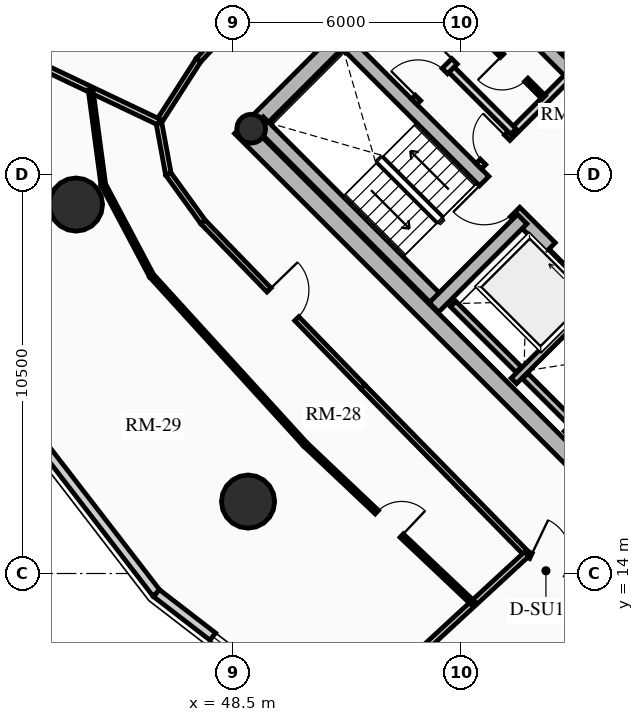
"""IFC4 building model, lengths in metres.
Left out: names, types, materials, properties, quantities, classifications, styles, units other than length and angle.
Written with IfcOpenShell. Run it as: python <this file> out.ifc"""

import sys

from ifc_helpers import new_model, si_unit, direction, frame, frame_2d, origin, origin_2d, place, context, subcontext, project, spatial, rectangle, circle, hollow_circle, extrude, source, transform, mapped, element, fill, save


model = new_model("IFC4")
c1 = context("Model", 3, precision=1e-05, world=origin(), true_north=direction((0.0, 1.0)))
c2 = subcontext(c1, "Body", "Model", "MODEL_VIEW")
j1 = project(units=[si_unit("LENGTHUNIT", "METRE"), si_unit("PLANEANGLEUNIT", "RADIAN")], contexts=[c1])
p1 = place(None, origin())
s1 = spatial("IfcSite", under=j1, at=p1, CompositionType="ELEMENT")
p2 = place(p1, origin())
s2 = spatial("IfcBuilding", under=s1, at=p2, CompositionType="ELEMENT")
p3 = place(p2, frame((0.0, 0.0, 119.62)))
s3 = spatial("IfcBuildingStorey", under=s2, at=p3, CompositionType="ELEMENT", Elevation=119.62)
for number, where, z_axis, x_axis in (
    (1, (58.737, 15.697, 0.0), (0.0, 0.0, 1.0), (-0.707, 0.707, 0.0)),
    (2, (66.303, 23.263, 0.0), (0.0, 0.0, 1.0), (-0.707, 0.707, 0.0)),
):
    element("IfcWall", number, at=place(p3, frame(where, z_axis=z_axis, x_axis=x_axis)), inside=s3, PredefinedType="SHEAR", context=c2, shape_type="SweptSolid", body=[
        extrude(rectangle(XDim=14.2, YDim=0.45, at=frame_2d((7.1, 0.0))), origin(), (0.0, 0.0, 1.0), 2.91),
    ])
p4 = place(p3, frame((48.856, 25.578, 0.0), z_axis=(0.0, 0.0, 1.0), x_axis=(0.707106781187, 0.707106781187, 0.0)))
e3 = element("IfcWall", 3, at=p4, inside=s3, PredefinedType="SHEAR", context=c2, shape_type="SweptSolid", body=[
    extrude(rectangle(XDim=10.7, YDim=0.45, at=frame_2d((5.35, 0.0))), origin(), (0.0, 0.0, 1.0), 2.91),
])
m1 = source(origin(), c2, "Body", "SweptSolid", [
    extrude(rectangle(XDim=1.5, YDim=2.02, at=frame_2d((0.75, 1.01))), frame((0.0, 0.235, 0.0), z_axis=(0.0, -1.0, 0.0), x_axis=(1.0, 0.0, 0.0)), (0.0, 0.0, 1.0), 0.47),
])
p5 = place(p4, frame((4.6, 0.0, 0.0)))
e4 = element("IfcOpeningElement", 4, at=p5, cuts=e3, PredefinedType="OPENING", context=c2, shape_type="MappedRepresentation", body=[
    mapped(m1, transform((0.0, 0.0, 0.0), x_axis=(1.0, 0.0, 0.0), y_axis=(0.0, 1.0, 0.0), z_axis=(0.0, 0.0, 1.0), scale=1.0)),
])
p6 = place(p3, frame((61.078, 18.355, 0.0), z_axis=(0.0, 0.0, 1.0), x_axis=(-0.707106781187, 0.707106781187, 0.0)))
e5 = element("IfcWall", 5, at=p6, inside=s3, PredefinedType="SHEAR", context=c2, shape_type="SweptSolid", body=[
    extrude(rectangle(XDim=13.75, YDim=0.35, at=frame_2d((6.875, 0.0))), origin(), (0.0, 0.0, 1.0), 2.91),
])
m2 = source(origin(), c2, "Body", "SweptSolid", [
    extrude(rectangle(XDim=1.1, YDim=2.015, at=frame_2d((0.55, 1.007))), frame((0.0, 0.185, 0.0), z_axis=(0.0, -1.0, 0.0), x_axis=(1.0, 0.0, 0.0)), (0.0, 0.0, 1.0), 0.37),
])
p7 = place(p6, frame((4.875, 0.0, 0.0)))
e6 = element("IfcOpeningElement", 6, at=p7, cuts=e5, PredefinedType="OPENING", context=c2, shape_type="MappedRepresentation", body=[
    mapped(m2, transform((0.0, 0.0, 0.0), x_axis=(1.0, 0.0, 0.0), y_axis=(0.0, 1.0, 0.0), z_axis=(0.0, 0.0, 1.0), scale=1.0)),
])
m3 = source(origin(), c2, "Body", "SweptSolid", [
    extrude(rectangle(XDim=1.15, YDim=2.02, at=frame_2d((0.575, 1.01))), frame((0.0, 0.185, 0.0), z_axis=(0.0, -1.0, 0.0), x_axis=(1.0, 0.0, 0.0)), (0.0, 0.0, 1.0), 0.37),
])
p8 = place(p6, frame((7.295, 0.0, 0.0)))
e7 = element("IfcOpeningElement", 7, at=p8, cuts=e5, PredefinedType="OPENING", context=c2, shape_type="MappedRepresentation", body=[
    mapped(m3, transform((0.0, 0.0, 0.0), x_axis=(1.0, 0.0, 0.0), y_axis=(0.0, 1.0, 0.0), z_axis=(0.0, 0.0, 1.0), scale=1.0)),
])
p9 = place(p3, frame((63.645, 20.922, 0.0), z_axis=(0.0, 0.0, 1.0), x_axis=(-0.707106781187, 0.707106781187, 0.0)))
e8 = element("IfcWall", 8, at=p9, inside=s3, PredefinedType="SHEAR", context=c2, shape_type="SweptSolid", body=[
    extrude(rectangle(XDim=13.75, YDim=0.35, at=frame_2d((6.875, 0.0))), origin(), (0.0, 0.0, 1.0), 2.91),
])
p10 = place(p9, frame((10.0, 0.0, 0.0)))
e9 = element("IfcOpeningElement", 9, at=p10, cuts=e8, PredefinedType="OPENING", context=c2, shape_type="MappedRepresentation", body=[
    mapped(m2, transform((0.0, 0.0, 0.0), x_axis=(1.0, 0.0, 0.0), y_axis=(0.0, 1.0, 0.0), z_axis=(0.0, 0.0, 1.0), scale=1.0)),
])
p11 = place(p9, frame((12.0, 0.0, 0.0)))
e10 = element("IfcOpeningElement", 10, at=p11, cuts=e8, PredefinedType="OPENING", context=c2, shape_type="MappedRepresentation", body=[
    mapped(m2, transform((0.0, 0.0, 0.0), x_axis=(1.0, 0.0, 0.0), y_axis=(0.0, 1.0, 0.0), z_axis=(0.0, 0.0, 1.0), scale=1.0)),
])
p12 = place(p9, frame((5.305, 0.0, 0.0)))
e11 = element("IfcOpeningElement", 11, at=p12, cuts=e8, PredefinedType="OPENING", context=c2, shape_type="MappedRepresentation", body=[
    mapped(m3, transform((0.0, 0.0, 0.0), x_axis=(1.0, 0.0, 0.0), y_axis=(0.0, 1.0, 0.0), z_axis=(0.0, 0.0, 1.0), scale=1.0)),
])
p13 = place(p3, frame((53.922, 21.141, 0.0), z_axis=(0.0, 0.0, 1.0), x_axis=(-0.707088616009, 0.707124945897, 0.0)))
e12 = element("IfcWall", 12, at=p13, inside=s3, PredefinedType="SHEAR", context=c2, shape_type="SweptSolid", body=[
    extrude(rectangle(XDim=6.72, YDim=0.35, at=frame_2d((3.36, 0.0))), origin(), (0.0, 0.0, 1.0), 2.91),
])
p14 = place(p3, frame((53.784, 21.003, 0.0), z_axis=(0.0, 0.0, 1.0), x_axis=(0.707106781187, 0.707106781187, 0.0)))
e13 = element("IfcWall", 13, at=p14, inside=s3, PredefinedType="SHEAR", context=c2, shape_type="SweptSolid", body=[
    extrude(rectangle(XDim=3.285, YDim=0.35, at=frame_2d((1.643, 0.0))), origin(), (0.0, 0.0, 1.0), 2.91),
])
p15 = place(p3, frame((48.976, 25.706, 0.0), z_axis=(0.0, 0.0, 1.0), x_axis=(0.707106781187, 0.707106781187, 0.0)))
e14 = element("IfcColumn", 14, at=p15, inside=s3, PredefinedType="COLUMN", context=c2, shape_type="SweptSolid", body=[
    extrude(hollow_circle(Radius=0.38, WallThickness=0.032, at=origin_2d()), origin(), (0.0, 0.0, 1.0), 2.91),
])
for number, where, z_axis, x_axis in (
    (15, (44.365, 23.709, 0.0), (0.0, 0.0, 1.0), (1.0, 0.0, 0.0)),
    (16, (48.893, 15.893, 0.0), (0.0, 0.0, 1.0), (1.0, 0.0, 0.0)),
):
    element("IfcColumn", number, at=place(p3, frame(where, z_axis=z_axis, x_axis=x_axis)), inside=s3, PredefinedType="USERDEFINED", context=c2, shape_type="SweptSolid", body=[
        extrude(circle(Radius=0.7, at=origin_2d()), origin(), (0.0, 0.0, 1.0), 2.91),
    ])
p16 = place(p3, frame((46.483, 13.483, 0.0), z_axis=(0.0, 0.0, 1.0), x_axis=(-0.61054437102, 0.791982052206, 0.0)))
e17 = element("IfcWall", 17, at=p16, inside=s3, PredefinedType="SOLIDWALL", context=c2, shape_type="SweptSolid", body=[
    extrude(rectangle(XDim=5.942, YDim=0.24, at=frame_2d((2.971, 0.0))), origin(), (0.0, 0.0, 1.0), 2.179),
])
p17 = place(p3, frame((51.189, 9.855, 0.0), z_axis=(0.0, 0.0, 1.0), x_axis=(-0.791982052206, 0.61054437102, 0.0)))
e18 = element("IfcWall", 18, at=p17, inside=s3, PredefinedType="SOLIDWALL", context=c2, shape_type="SweptSolid", body=[
    extrude(rectangle(XDim=5.942, YDim=0.24, at=frame_2d((2.971, 0.0))), origin(), (0.0, 0.0, 1.0), 2.179),
])
m4 = source(origin(), c2, "Body", "SweptSolid", [
    extrude(rectangle(XDim=2.2, YDim=1.35, at=frame_2d((1.1, 0.675))), frame((0.0, 0.13, 0.0), z_axis=(0.0, -1.0, 0.0), x_axis=(1.0, 0.0, 0.0)), (0.0, 0.0, 1.0), 0.26),
])
p18 = place(p17, frame((1.871, 0.0, 0.65)))
e19 = element("IfcOpeningElement", 19, at=p18, cuts=e18, PredefinedType="OPENING", context=c2, shape_type="MappedRepresentation", body=[
    mapped(m4, transform((0.0, 0.0, 0.0), x_axis=(1.0, 0.0, 0.0), y_axis=(0.0, 1.0, 0.0), z_axis=(0.0, 0.0, 1.0), scale=1.0)),
])
p19 = place(p3, frame((55.888, 19.069, 0.0), z_axis=(0.0, 0.0, 1.0), x_axis=(0.707106781187, 0.707106781187, 0.0)))
e20 = element("IfcWall", 20, at=p19, inside=s3, PredefinedType="SHEAR", context=c2, shape_type="SweptSolid", body=[
    extrude(rectangle(XDim=2.97, YDim=0.2, at=frame_2d((1.485, 0.0))), origin(), (0.0, 0.0, 1.0), 2.91),
])
p20 = place(p3, frame((56.015, 19.366, 0.0), z_axis=(0.0, 0.0, 1.0), x_axis=(-0.707106781187, 0.707106781187, 0.0)))
e21 = element("IfcWall", 21, at=p20, inside=s3, PredefinedType="SHEAR", context=c2, shape_type="SweptSolid", body=[
    extrude(rectangle(XDim=2.44, YDim=0.2, at=frame_2d((1.22, 0.0))), origin(), (0.0, 0.0, 1.0), 2.91),
])
p21 = place(p3, frame((57.284, 17.673, 0.0), z_axis=(0.0, 0.0, 1.0), x_axis=(0.707147878904, 0.70706568108, 0.0)))
e22 = element("IfcWall", 22, at=p21, inside=s3, PredefinedType="SHEAR", context=c2, shape_type="SweptSolid", body=[
    extrude(rectangle(XDim=2.97, YDim=0.2, at=frame_2d((1.485, 0.0))), origin(), (0.0, 0.0, 1.0), 2.91),
])
p22 = place(p3, frame((57.412, 17.97, 0.0), z_axis=(0.0, 0.0, 1.0), x_axis=(-0.707106781187, 0.707106781187, 0.0)))
e23 = element("IfcWall", 23, at=p22, inside=s3, PredefinedType="SHEAR", context=c2, shape_type="SweptSolid", body=[
    extrude(rectangle(XDim=1.735, YDim=0.2, at=frame_2d((0.867, 0.0))), origin(), (0.0, 0.0, 1.0), 2.91),
])
p23 = place(p3, frame((57.062, 27.781, 0.0), z_axis=(0.0, 0.0, 1.0), x_axis=(0.707106781187, 0.707106781187, 0.0)))
e24 = element("IfcWall", 24, at=p23, inside=s3, PredefinedType="SHEAR", context=c2, shape_type="SweptSolid", body=[
    extrude(rectangle(XDim=2.97, YDim=0.2, at=frame_2d((1.485, 0.0))), origin(), (0.0, 0.0, 1.0), 2.91),
])
p24 = place(p3, frame((54.961, 24.719, 0.0), z_axis=(0.0, 0.0, 1.0), x_axis=(0.707106781187, 0.707106781187, 0.0)))
e25 = element("IfcWall", 25, at=p24, inside=s3, PredefinedType="PARTITIONING", context=c2, shape_type="SweptSolid", body=[
    extrude(rectangle(XDim=3.28, YDim=0.2, at=frame_2d((1.64, 0.0))), origin(), (0.0, 0.0, 1.0), 2.655),
])
m5 = source(origin(), c2, "Body", "SweptSolid", [
    extrude(rectangle(XDim=0.9, YDim=2.005, at=frame_2d((0.45, 1.002))), frame((0.0, 0.11, 0.0), z_axis=(0.0, -1.0, 0.0), x_axis=(1.0, 0.0, 0.0)), (0.0, 0.0, 1.0), 0.22),
])
p25 = place(p24, frame((0.16, 0.0, 0.0)))
e26 = element("IfcOpeningElement", 26, at=p25, cuts=e25, PredefinedType="OPENING", context=c2, shape_type="MappedRepresentation", body=[
    mapped(m5, transform((0.0, 0.0, 0.0), x_axis=(1.0, 0.0, 0.0), y_axis=(0.0, 1.0, 0.0), z_axis=(0.0, 0.0, 1.0), scale=1.0)),
])
p26 = place(p3, frame((55.874, 25.631, 0.0), z_axis=(0.0, 0.0, 1.0), x_axis=(-0.707157639372, 0.707055919343, 0.0)))
e27 = element("IfcWall", 27, at=p26, inside=s3, PredefinedType="PARTITIONING", context=c2, shape_type="SweptSolid", body=[
    extrude(rectangle(XDim=2.4, YDim=0.2, at=frame_2d((1.2, 0.0))), origin(), (0.0, 0.0, 1.0), 2.655),
])
p27 = place(p3, frame((53.264, 26.416, 0.0), z_axis=(0.0, 0.0, 1.0), x_axis=(0.707106781187, 0.707106781187, 0.0)))
e28 = element("IfcWall", 28, at=p27, inside=s3, PredefinedType="PARTITIONING", context=c2, shape_type="SweptSolid", body=[
    extrude(rectangle(XDim=3.28, YDim=0.2, at=frame_2d((1.64, 0.0))), origin(), (0.0, 0.0, 1.0), 2.655),
])
m6 = source(origin(), c2, "Body", "SweptSolid", [
    extrude(rectangle(XDim=1.0, YDim=2.015, at=frame_2d((0.5, 1.007))), frame((0.0, 0.11, 0.0), z_axis=(0.0, -1.0, 0.0), x_axis=(1.0, 0.0, 0.0)), (0.0, 0.0, 1.0), 0.22),
])
p28 = place(p27, frame((0.14, 0.0, 0.0)))
e29 = element("IfcOpeningElement", 29, at=p28, cuts=e28, PredefinedType="OPENING", context=c2, shape_type="MappedRepresentation", body=[
    mapped(m6, transform((0.0, 0.0, 0.0), x_axis=(1.0, 0.0, 0.0), y_axis=(0.0, 1.0, 0.0), z_axis=(0.0, 0.0, 1.0), scale=1.0)),
])
p29 = place(p27, frame((1.5, 0.0, 0.0)))
e30 = element("IfcOpeningElement", 30, at=p29, cuts=e28, PredefinedType="OPENING", context=c2, shape_type="MappedRepresentation", body=[
    mapped(m5, transform((0.0, 0.0, 0.0), x_axis=(1.0, 0.0, 0.0), y_axis=(0.0, 1.0, 0.0), z_axis=(0.0, 0.0, 1.0), scale=1.0)),
])
p30 = place(p3, frame((56.673, 26.529, 0.0), z_axis=(0.0, 0.0, 1.0), x_axis=(-0.707052764397, 0.70716079385, 0.0)))
e31 = element("IfcWall", 31, at=p30, inside=s3, PredefinedType="PARTITIONING", context=c2, shape_type="SweptSolid", body=[
    extrude(rectangle(XDim=2.26, YDim=0.125, at=frame_2d((1.13, 0.0))), origin(), (0.0, 0.0, 1.0), 2.655),
])
m7 = source(origin(), c2, "Body", "SweptSolid", [
    extrude(rectangle(XDim=0.9, YDim=2.005, at=frame_2d((0.45, 1.002))), frame((0.0, 0.073, 0.0), z_axis=(0.0, -1.0, 0.0), x_axis=(1.0, 0.0, 0.0)), (0.0, 0.0, 1.0), 0.145),
])
p31 = place(p30, frame((0.65, 0.0, 0.0)))
e32 = element("IfcOpeningElement", 32, at=p31, cuts=e31, PredefinedType="OPENING", context=c2, shape_type="MappedRepresentation", body=[
    mapped(m7, transform((0.0, 0.0, 0.0), x_axis=(1.0, 0.0, 0.0), y_axis=(0.0, 1.0, 0.0), z_axis=(0.0, 0.0, 1.0), scale=1.0)),
])
p32 = place(p3, frame((52.043, 32.28, 0.0), z_axis=(0.0, 0.0, 1.0), x_axis=(-0.682606081633, -0.730786519661, 0.0)))
e33 = element("IfcWall", 33, at=p32, inside=s3, PredefinedType="PARTITIONING", context=c2, shape_type="SweptSolid", body=[
    extrude(rectangle(XDim=6.527, YDim=0.15, at=frame_2d((3.263, 0.0))), origin(), (0.0, 0.0, 1.0), 2.225),
])
p33 = place(p3, frame((47.588, 27.51, 0.0), z_axis=(0.0, 0.0, 1.0), x_axis=(-0.540202619347, -0.841534984449, 0.0)))
e34 = element("IfcWall", 34, at=p33, inside=s3, PredefinedType="PARTITIONING", context=c2, shape_type="SweptSolid", body=[
    extrude(rectangle(XDim=1.935, YDim=0.15, at=frame_2d((0.967, 0.0))), origin(), (0.0, 0.0, 1.0), 2.225),
])
p34 = place(p3, frame((46.543, 25.882, 0.0), z_axis=(0.0, 0.0, 1.0), x_axis=(0.181153502579, -0.983454832976, 0.0)))
e35 = element("IfcWall", 35, at=p34, inside=s3, PredefinedType="PARTITIONING", context=c2, shape_type="SweptSolid", body=[
    extrude(rectangle(XDim=1.392, YDim=0.15, at=frame_2d((0.696, 0.0))), origin(), (0.0, 0.0, 1.0), 2.225),
])
p35 = place(p3, frame((46.795, 24.513, 0.0), z_axis=(0.0, 0.0, 1.0), x_axis=(0.585628197524, -0.810579801294, 0.0)))
e36 = element("IfcWall", 36, at=p35, inside=s3, PredefinedType="PARTITIONING", context=c2, shape_type="SweptSolid", body=[
    extrude(rectangle(XDim=1.554, YDim=0.15, at=frame_2d((0.777, 0.0))), origin(), (0.0, 0.0, 1.0), 2.225),
])
p36 = place(p3, frame((47.706, 23.253, 0.0), z_axis=(0.0, 0.0, 1.0), x_axis=(0.696179266346, -0.717867974707, 0.0)))
e37 = element("IfcWall", 37, at=p36, inside=s3, PredefinedType="PARTITIONING", context=c2, shape_type="SweptSolid", body=[
    extrude(rectangle(XDim=6.045, YDim=0.15, at=frame_2d((3.022, 0.0))), origin(), (0.0, 0.0, 1.0), 2.655),
])
m8 = source(origin(), c2, "Body", "SweptSolid", [
    extrude(rectangle(XDim=1.05, YDim=2.015, at=frame_2d((0.525, 1.007))), frame((0.0, 0.085, 0.0), z_axis=(0.0, -1.0, 0.0), x_axis=(1.0, 0.0, 0.0)), (0.0, 0.0, 1.0), 0.17),
])
p37 = place(p36, frame((2.497, 0.0, 0.0)))
e38 = element("IfcOpeningElement", 38, at=p37, cuts=e37, PredefinedType="OPENING", context=c2, shape_type="MappedRepresentation", body=[
    mapped(m8, transform((0.0, 0.0, 0.0), x_axis=(1.0, 0.0, 0.0), y_axis=(0.0, 1.0, 0.0), z_axis=(0.0, 0.0, 1.0), scale=1.0)),
])
p38 = place(p3, frame((51.914, 18.914, 0.0), z_axis=(0.0, 0.0, 1.0), x_axis=(0.699999313799, -0.714143515465, 0.0)))
e39 = element("IfcWall", 39, at=p38, inside=s3, PredefinedType="PARTITIONING", context=c2, shape_type="SweptSolid", body=[
    extrude(rectangle(XDim=6.162, YDim=0.15, at=frame_2d((3.081, 0.0))), origin(), (0.0, 0.0, 1.0), 2.225),
])
p39 = place(p3, frame((56.227, 14.513, 0.0), z_axis=(0.0, 0.0, 1.0), x_axis=(0.901477579283, -0.432825801044, 0.0)))
e40 = element("IfcWall", 40, at=p39, inside=s3, PredefinedType="PARTITIONING", context=c2, shape_type="SweptSolid", body=[
    extrude(rectangle(XDim=1.424, YDim=0.15, at=frame_2d((0.712, 0.0))), origin(), (0.0, 0.0, 1.0), 2.225),
])
p40 = place(p39, frame((0.12, 0.0, 0.0)))
e41 = element("IfcOpeningElement", 41, at=p40, cuts=e40, PredefinedType="OPENING", context=c2, shape_type="MappedRepresentation", body=[
    mapped(m8, transform((0.0, 0.0, 0.0), x_axis=(1.0, 0.0, 0.0), y_axis=(0.0, 1.0, 0.0), z_axis=(0.0, 0.0, 1.0), scale=1.0)),
])
p41 = place(p3, frame((46.543, 25.882, 0.0), z_axis=(0.0, 0.0, 1.0), x_axis=(-0.903054383171, 0.429526228576, 0.0)))
e42 = element("IfcWall", 42, at=p41, inside=s3, PredefinedType="PARTITIONING", context=c2, shape_type="SweptSolid", body=[
    extrude(rectangle(XDim=7.096, YDim=0.16, at=frame_2d((3.548, 0.0))), origin(), (0.0, 0.0, 1.0), 2.179),
])
p42 = place(p3, frame((56.227, 14.513, 0.0), z_axis=(0.0, 0.0, 1.0), x_axis=(-0.734951144322, -0.678120059768, 0.0)))
e43 = element("IfcWall", 43, at=p42, inside=s3, PredefinedType="PARTITIONING", context=c2, shape_type="SweptSolid", body=[
    extrude(rectangle(XDim=6.843, YDim=0.16, at=frame_2d((3.422, 0.0))), origin(), (0.0, 0.0, 1.0), 2.179),
])
p43 = place(p3, frame((44.749, 26.736, 0.0), z_axis=(0.0, 0.0, 1.0), x_axis=(0.132518524874, -0.991180528746, 0.0)))
e44 = element("IfcWall", 44, at=p43, inside=s3, PredefinedType="PARTITIONING", context=c2, shape_type="SweptSolid", body=[
    extrude(rectangle(XDim=2.524, YDim=0.125, at=frame_2d((1.262, 0.0))), origin(), (0.0, 0.0, 1.0), 2.179),
])
p44 = place(p3, frame((45.083, 24.234, 0.0), z_axis=(0.0, 0.0, 1.0), x_axis=(0.468015958378, -0.883720013751, 0.0)))
e45 = element("IfcWall", 45, at=p44, inside=s3, PredefinedType="PARTITIONING", context=c2, shape_type="SweptSolid", body=[
    extrude(rectangle(XDim=2.711, YDim=0.125, at=frame_2d((1.356, 0.0))), origin(), (0.0, 0.0, 1.0), 2.225),
])
p45 = place(p3, frame((46.352, 21.838, 0.0), z_axis=(0.0, 0.0, 1.0), x_axis=(0.673416949194, -0.739262884594, 0.0)))
e46 = element("IfcWall", 46, at=p45, inside=s3, PredefinedType="PARTITIONING", context=c2, shape_type="SweptSolid", body=[
    extrude(rectangle(XDim=6.007, YDim=0.125, at=frame_2d((3.003, 0.0))), origin(), (0.0, 0.0, 1.0), 2.655),
])
p46 = place(p3, frame((50.397, 17.397, 0.0), z_axis=(0.0, 0.0, 1.0), x_axis=(0.726427828833, -0.687242758781, 0.0)))
e47 = element("IfcWall", 47, at=p46, inside=s3, PredefinedType="PARTITIONING", context=c2, shape_type="SweptSolid", body=[
    extrude(rectangle(XDim=6.087, YDim=0.125, at=frame_2d((3.043, 0.0))), origin(), (0.0, 0.0, 1.0), 2.225),
])
p47 = place(p46, frame((2.594, 0.0, 0.0)))
e48 = element("IfcOpeningElement", 48, at=p47, cuts=e47, PredefinedType="OPENING", context=c2, shape_type="MappedRepresentation", body=[
    mapped(m7, transform((0.0, 0.0, 0.0), x_axis=(1.0, 0.0, 0.0), y_axis=(0.0, 1.0, 0.0), z_axis=(0.0, 0.0, 1.0), scale=1.0)),
])
m9 = source(origin(), c2, "Body", "SweptSolid", [
    extrude(rectangle(XDim=2.2, YDim=1.35, at=frame_2d((1.1, 0.675))), frame((0.0, 0.03, 0.0), z_axis=(0.0, -1.0, 0.0), x_axis=(1.0, 0.0, 0.0)), (0.0, 0.0, 1.0), 0.06),
])
p48 = place(p18, origin())
e49 = element("IfcWindow", 49, at=p48, inside=s3, PartitioningType="DOUBLE_PANEL_VERTICAL", PredefinedType="WINDOW", context=c2, shape_type="MappedRepresentation", body=[
    mapped(m9, transform((0.0, 0.0, 0.0), x_axis=(1.0, 0.0, 0.0), y_axis=(0.0, 1.0, 0.0), z_axis=(0.0, 0.0, 1.0), scale=1.0)),
])
fill(e19, e49)
m10 = source(origin(), c2, "Body", "SweptSolid", [
    extrude(rectangle(XDim=1.1, YDim=2.015, at=frame_2d((0.55, 1.007))), frame((0.0, 0.025, 0.0), z_axis=(0.0, -1.0, 0.0), x_axis=(1.0, 0.0, 0.0)), (0.0, 0.0, 1.0), 0.05),
])
p49 = place(p7, origin())
e50 = element("IfcDoor", 50, at=p49, inside=s3, OperationType="SLIDING_TO_RIGHT", PredefinedType="DOOR", context=c2, shape_type="MappedRepresentation", body=[
    mapped(m10, transform((0.0, 0.0, 0.0), x_axis=(1.0, 0.0, 0.0), y_axis=(0.0, 1.0, 0.0), z_axis=(0.0, 0.0, 1.0), scale=1.0)),
])
fill(e6, e50)
m11 = source(origin(), c2, "Body", "SweptSolid", [
    extrude(rectangle(XDim=1.15, YDim=2.02, at=frame_2d((0.575, 1.01))), frame((0.0, 0.025, 0.0), z_axis=(0.0, -1.0, 0.0), x_axis=(1.0, 0.0, 0.0)), (0.0, 0.0, 1.0), 0.05),
])
p50 = place(p8, origin())
e51 = element("IfcDoor", 51, at=p50, inside=s3, OperationType="SINGLE_SWING_RIGHT", PredefinedType="DOOR", context=c2, shape_type="MappedRepresentation", body=[
    mapped(m11, transform((0.0, 0.0, 0.0), x_axis=(1.0, 0.0, 0.0), y_axis=(0.0, 1.0, 0.0), z_axis=(0.0, 0.0, 1.0), scale=1.0)),
])
fill(e7, e51)
m12 = source(origin(), c2, "Body", "SweptSolid", [
    extrude(rectangle(XDim=0.9, YDim=2.005, at=frame_2d((0.45, 1.002))), frame((0.0, 0.025, 0.0), z_axis=(0.0, -1.0, 0.0), x_axis=(1.0, 0.0, 0.0)), (0.0, 0.0, 1.0), 0.05),
])
p51 = place(p25, origin())
e52 = element("IfcDoor", 52, at=p51, inside=s3, OperationType="SINGLE_SWING_RIGHT", PredefinedType="DOOR", context=c2, shape_type="MappedRepresentation", body=[
    mapped(m12, transform((0.0, 0.0, 0.0), x_axis=(1.0, 0.0, 0.0), y_axis=(0.0, 1.0, 0.0), z_axis=(0.0, 0.0, 1.0), scale=1.0)),
])
fill(e26, e52)
m13 = source(origin(), c2, "Body", "SweptSolid", [
    extrude(rectangle(XDim=1.0, YDim=2.015, at=frame_2d((0.5, 1.007))), frame((0.0, 0.025, 0.0), z_axis=(0.0, -1.0, 0.0), x_axis=(1.0, 0.0, 0.0)), (0.0, 0.0, 1.0), 0.05),
])
p52 = place(p28, origin())
e53 = element("IfcDoor", 53, at=p52, inside=s3, OperationType="SINGLE_SWING_LEFT", PredefinedType="DOOR", context=c2, shape_type="MappedRepresentation", body=[
    mapped(m13, transform((0.0, 0.0, 0.0), x_axis=(1.0, 0.0, 0.0), y_axis=(0.0, 1.0, 0.0), z_axis=(0.0, 0.0, 1.0), scale=1.0)),
])
fill(e29, e53)
p53 = place(p29, origin())
e54 = element("IfcDoor", 54, at=p53, inside=s3, OperationType="SINGLE_SWING_LEFT", PredefinedType="DOOR", context=c2, shape_type="MappedRepresentation", body=[
    mapped(m12, transform((0.0, 0.0, 0.0), x_axis=(1.0, 0.0, 0.0), y_axis=(0.0, 1.0, 0.0), z_axis=(0.0, 0.0, 1.0), scale=1.0)),
])
fill(e30, e54)
p54 = place(p31, origin())
e55 = element("IfcDoor", 55, at=p54, inside=s3, OperationType="SINGLE_SWING_RIGHT", PredefinedType="DOOR", context=c2, shape_type="MappedRepresentation", body=[
    mapped(m12, transform((0.0, 0.0, 0.0), x_axis=(1.0, 0.0, 0.0), y_axis=(0.0, 1.0, 0.0), z_axis=(0.0, 0.0, 1.0), scale=1.0)),
])
fill(e32, e55)
m14 = source(origin(), c2, "Body", "SweptSolid", [
    extrude(rectangle(XDim=1.05, YDim=2.015, at=frame_2d((0.525, 1.007))), frame((0.0, 0.025, 0.0), z_axis=(0.0, -1.0, 0.0), x_axis=(1.0, 0.0, 0.0)), (0.0, 0.0, 1.0), 0.05),
])
p55 = place(p37, origin())
e56 = element("IfcDoor", 56, at=p55, inside=s3, OperationType="SINGLE_SWING_LEFT", PredefinedType="DOOR", context=c2, shape_type="MappedRepresentation", body=[
    mapped(m14, transform((0.0, 0.0, 0.0), x_axis=(1.0, 0.0, 0.0), y_axis=(0.0, 1.0, 0.0), z_axis=(0.0, 0.0, 1.0), scale=1.0)),
])
fill(e38, e56)
p56 = place(p47, origin())
e57 = element("IfcDoor", 57, at=p56, inside=s3, OperationType="SINGLE_SWING_RIGHT", PredefinedType="DOOR", context=c2, shape_type="MappedRepresentation", body=[
    mapped(m12, transform((0.0, 0.0, 0.0), x_axis=(1.0, 0.0, 0.0), y_axis=(0.0, 1.0, 0.0), z_axis=(0.0, 0.0, 1.0), scale=1.0)),
])
fill(e48, e57)
p57 = place(p40, origin())
e58 = element("IfcDoor", 58, at=p57, inside=s3, OperationType="SINGLE_SWING_LEFT", PredefinedType="DOOR", context=c2, shape_type="MappedRepresentation", body=[
    mapped(m14, transform((0.0, 0.0, 0.0), x_axis=(1.0, 0.0, 0.0), y_axis=(0.0, 1.0, 0.0), z_axis=(0.0, 0.0, 1.0), scale=1.0)),
])
fill(e41, e58)
save(model, sys.argv[1])
